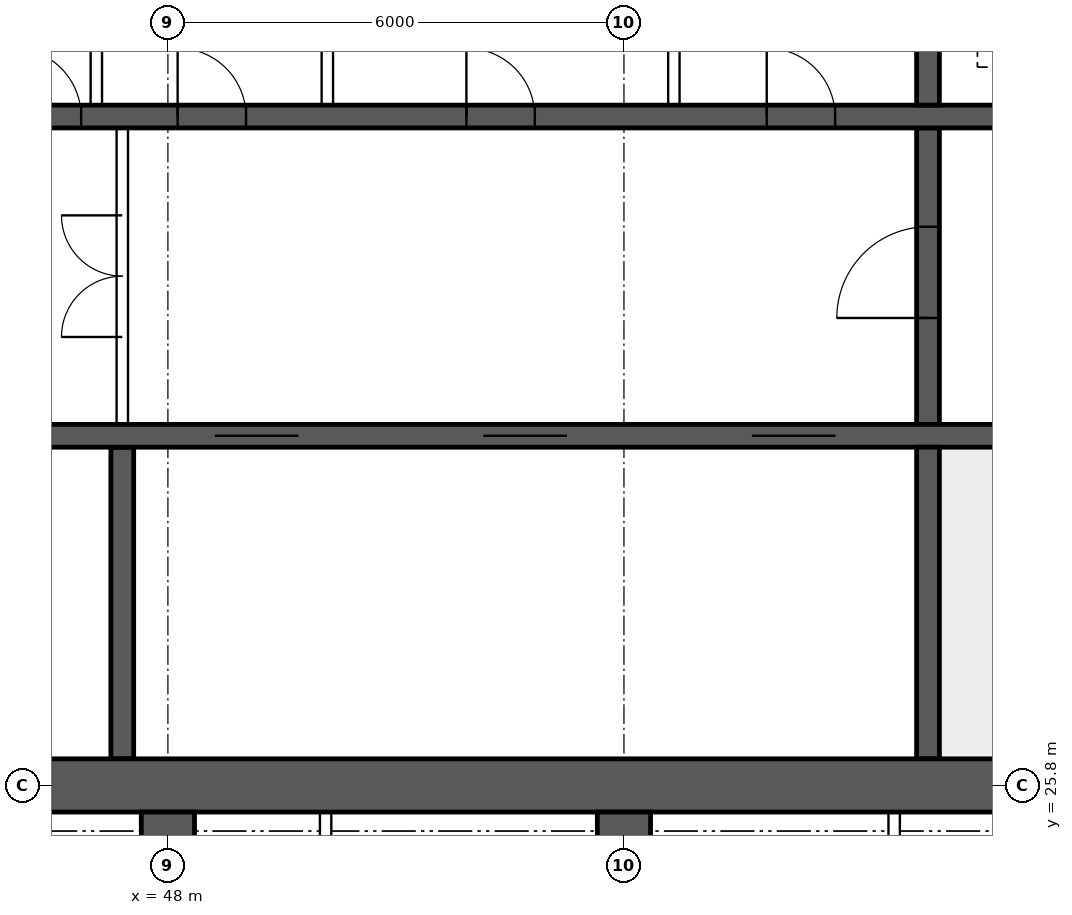
"""IFC4 building model, lengths in metres.
Left out: names, types, materials, properties, quantities, classifications, styles, units other than length and angle.
Written with IfcOpenShell. Run it as: python <this file> out.ifc"""

import sys

from ifc_helpers import new_model, si_unit, direction, frame, frame_2d, origin, place, context, subcontext, project, spatial, rectangle, extrude, element, fill, save


model = new_model("IFC4")
c1 = context("Model", 3, precision=1e-05, world=origin(), true_north=direction((0.0, 1.0)))
c2 = subcontext(c1, "Body", "Model", "MODEL_VIEW")
j1 = project(units=[si_unit("LENGTHUNIT", "METRE"), si_unit("PLANEANGLEUNIT", "RADIAN")], contexts=[c1])
p1 = place(None, origin())
s1 = spatial("IfcSite", under=j1, at=p1, CompositionType="ELEMENT")
p2 = place(p1, origin())
s2 = spatial("IfcBuilding", under=s1, at=p2, CompositionType="ELEMENT")
p3 = place(p2, frame((0.0, 0.0, 246.55)))
s3 = spatial("IfcBuildingStorey", under=s2, at=p3, CompositionType="ELEMENT", Elevation=246.55)
p4 = place(p3, frame((18.0, 25.8, 0.0), z_axis=(0.0, 0.0, 1.0), x_axis=(1.0, 0.0, 0.0)))
e1 = element("IfcWall", 1, at=p4, inside=s3, PredefinedType="SHEAR", context=c2, shape_type="SweptSolid", body=[
    extrude(rectangle(XDim=48.0, YDim=0.7, at=frame_2d((24.0, 0.0))), origin(), (0.0, 0.0, 1.0), 3.75),
])
p5 = place(p3, frame((18.35, 30.4, 0.0), z_axis=(0.0, 0.0, 1.0), x_axis=(1.0, 0.0, 0.0)))
e2 = element("IfcWall", 2, at=p5, inside=s3, PredefinedType="SHEAR", context=c2, shape_type="SweptSolid", body=[
    extrude(rectangle(XDim=47.3, YDim=0.3, at=frame_2d((23.65, 0.0))), origin(), (0.0, 0.0, 1.0), 3.75),
])
p6 = place(p5, frame((0.4, 0.0, 0.0)))
e3 = element("IfcOpeningElement", 3, at=p6, cuts=e2, PredefinedType="OPENING", context=c2, shape_type="SweptSolid", body=[
    extrude(rectangle(XDim=1.0, YDim=2.1, at=frame_2d((0.5, 1.05))), frame((0.0, 0.16, 0.0), z_axis=(0.0, -1.0, 0.0), x_axis=(1.0, 0.0, 0.0)), (0.0, 0.0, 1.0), 0.32),
])
p7 = place(p5, frame((45.9, 0.0, 0.0)))
e4 = element("IfcOpeningElement", 4, at=p7, cuts=e2, PredefinedType="OPENING", context=c2, shape_type="SweptSolid", body=[
    extrude(rectangle(XDim=1.0, YDim=2.1, at=frame_2d((0.5, 1.05))), frame((0.0, 0.16, 0.0), z_axis=(0.0, -1.0, 0.0), x_axis=(1.0, 0.0, 0.0)), (0.0, 0.0, 1.0), 0.32),
])
p8 = place(p5, frame((8.4, 0.0, 0.0)))
e5 = element("IfcOpeningElement", 5, at=p8, cuts=e2, PredefinedType="OPENING", context=c2, shape_type="SweptSolid", body=[
    extrude(rectangle(XDim=1.1, YDim=2.1, at=frame_2d((0.55, 1.05))), frame((0.0, 0.16, 0.0), z_axis=(0.0, -1.0, 0.0), x_axis=(1.0, 0.0, 0.0)), (0.0, 0.0, 1.0), 0.32),
])
p9 = place(p5, frame((11.0, 0.0, 0.0)))
e6 = element("IfcOpeningElement", 6, at=p9, cuts=e2, PredefinedType="OPENING", context=c2, shape_type="SweptSolid", body=[
    extrude(rectangle(XDim=1.1, YDim=2.1, at=frame_2d((0.55, 1.05))), frame((0.0, 0.16, 0.0), z_axis=(0.0, -1.0, 0.0), x_axis=(1.0, 0.0, 0.0)), (0.0, 0.0, 1.0), 0.32),
])
p10 = place(p5, frame((13.6, 0.0, 0.0)))
e7 = element("IfcOpeningElement", 7, at=p10, cuts=e2, PredefinedType="OPENING", context=c2, shape_type="SweptSolid", body=[
    extrude(rectangle(XDim=1.1, YDim=2.1, at=frame_2d((0.55, 1.05))), frame((0.0, 0.16, 0.0), z_axis=(0.0, -1.0, 0.0), x_axis=(1.0, 0.0, 0.0)), (0.0, 0.0, 1.0), 0.32),
])
p11 = place(p5, frame((16.2, 0.0, 0.0)))
e8 = element("IfcOpeningElement", 8, at=p11, cuts=e2, PredefinedType="OPENING", context=c2, shape_type="SweptSolid", body=[
    extrude(rectangle(XDim=1.1, YDim=2.1, at=frame_2d((0.55, 1.05))), frame((0.0, 0.16, 0.0), z_axis=(0.0, -1.0, 0.0), x_axis=(1.0, 0.0, 0.0)), (0.0, 0.0, 1.0), 0.32),
])
p12 = place(p5, frame((18.975, 0.0, 0.0)))
e9 = element("IfcOpeningElement", 9, at=p12, cuts=e2, PredefinedType="OPENING", context=c2, shape_type="SweptSolid", body=[
    extrude(rectangle(XDim=0.9, YDim=2.1, at=frame_2d((0.45, 1.05))), frame((0.0, 0.16, 0.0), z_axis=(0.0, -1.0, 0.0), x_axis=(1.0, 0.0, 0.0)), (0.0, 0.0, 1.0), 0.32),
])
p13 = place(p5, frame((24.475, 0.0, 0.0)))
e10 = element("IfcOpeningElement", 10, at=p13, cuts=e2, PredefinedType="OPENING", context=c2, shape_type="SweptSolid", body=[
    extrude(rectangle(XDim=0.9, YDim=2.1, at=frame_2d((0.45, 1.05))), frame((0.0, 0.16, 0.0), z_axis=(0.0, -1.0, 0.0), x_axis=(1.0, 0.0, 0.0)), (0.0, 0.0, 1.0), 0.32),
])
p14 = place(p5, frame((30.267, 0.0, 0.0)))
e11 = element("IfcOpeningElement", 11, at=p14, cuts=e2, PredefinedType="OPENING", context=c2, shape_type="SweptSolid", body=[
    extrude(rectangle(XDim=1.1, YDim=2.1, at=frame_2d((0.55, 1.05))), frame((0.0, 0.16, 0.0), z_axis=(0.0, -1.0, 0.0), x_axis=(1.0, 0.0, 0.0)), (0.0, 0.0, 1.0), 0.32),
])
p15 = place(p5, frame((33.8, 0.0, 0.0)))
e12 = element("IfcOpeningElement", 12, at=p15, cuts=e2, PredefinedType="OPENING", context=c2, shape_type="SweptSolid", body=[
    extrude(rectangle(XDim=1.1, YDim=2.1, at=frame_2d((0.55, 1.05))), frame((0.0, 0.16, 0.0), z_axis=(0.0, -1.0, 0.0), x_axis=(1.0, 0.0, 0.0)), (0.0, 0.0, 1.0), 0.32),
])
p16 = place(p5, frame((37.333, 0.0, 0.0)))
e13 = element("IfcOpeningElement", 13, at=p16, cuts=e2, PredefinedType="OPENING", context=c2, shape_type="SweptSolid", body=[
    extrude(rectangle(XDim=1.1, YDim=2.1, at=frame_2d((0.55, 1.05))), frame((0.0, 0.16, 0.0), z_axis=(0.0, -1.0, 0.0), x_axis=(1.0, 0.0, 0.0)), (0.0, 0.0, 1.0), 0.32),
])
p17 = place(p3, frame((18.35, 34.6, 0.0), z_axis=(0.0, 0.0, 1.0), x_axis=(1.0, 0.0, 0.0)))
e14 = element("IfcWall", 14, at=p17, inside=s3, PredefinedType="SHEAR", context=c2, shape_type="SweptSolid", body=[
    extrude(rectangle(XDim=47.3, YDim=0.3, at=frame_2d((23.65, 0.0))), origin(), (0.0, 0.0, 1.0), 3.75),
])
p18 = place(p17, frame((0.9, 0.0, 0.0)))
e15 = element("IfcOpeningElement", 15, at=p18, cuts=e14, PredefinedType="OPENING", context=c2, shape_type="SweptSolid", body=[
    extrude(rectangle(XDim=1.1, YDim=2.1, at=frame_2d((0.55, 1.05))), frame((0.0, 0.16, 0.0), z_axis=(0.0, -1.0, 0.0), x_axis=(1.0, 0.0, 0.0)), (0.0, 0.0, 1.0), 0.32),
])
p19 = place(p17, frame((45.3, 0.0, 0.0)))
e16 = element("IfcOpeningElement", 16, at=p19, cuts=e14, PredefinedType="OPENING", context=c2, shape_type="SweptSolid", body=[
    extrude(rectangle(XDim=1.1, YDim=2.1, at=frame_2d((0.55, 1.05))), frame((0.0, 0.16, 0.0), z_axis=(0.0, -1.0, 0.0), x_axis=(1.0, 0.0, 0.0)), (0.0, 0.0, 1.0), 0.32),
])
p20 = place(p17, frame((4.25, 0.0, 0.0)))
e17 = element("IfcOpeningElement", 17, at=p20, cuts=e14, PredefinedType="OPENING", context=c2, shape_type="SweptSolid", body=[
    extrude(rectangle(XDim=0.9, YDim=2.1, at=frame_2d((0.45, 1.05))), frame((0.0, 0.16, 0.0), z_axis=(0.0, -1.0, 0.0), x_axis=(1.0, 0.0, 0.0)), (0.0, 0.0, 1.0), 0.32),
])
p21 = place(p17, frame((42.15, 0.0, 0.0)))
e18 = element("IfcOpeningElement", 18, at=p21, cuts=e14, PredefinedType="OPENING", context=c2, shape_type="SweptSolid", body=[
    extrude(rectangle(XDim=0.9, YDim=2.1, at=frame_2d((0.45, 1.05))), frame((0.0, 0.16, 0.0), z_axis=(0.0, -1.0, 0.0), x_axis=(1.0, 0.0, 0.0)), (0.0, 0.0, 1.0), 0.32),
])
p22 = place(p17, frame((9.025, 0.0, 0.0)))
e19 = element("IfcOpeningElement", 19, at=p22, cuts=e14, PredefinedType="OPENING", context=c2, shape_type="SweptSolid", body=[
    extrude(rectangle(XDim=0.9, YDim=2.1, at=frame_2d((0.45, 1.05))), frame((0.0, 0.16, 0.0), z_axis=(0.0, -1.0, 0.0), x_axis=(1.0, 0.0, 0.0)), (0.0, 0.0, 1.0), 0.32),
])
p23 = place(p17, frame((12.999, 0.0, 0.0)))
e20 = element("IfcOpeningElement", 20, at=p23, cuts=e14, PredefinedType="OPENING", context=c2, shape_type="SweptSolid", body=[
    extrude(rectangle(XDim=0.9, YDim=2.1, at=frame_2d((0.45, 1.05))), frame((0.0, 0.16, 0.0), z_axis=(0.0, -1.0, 0.0), x_axis=(1.0, 0.0, 0.0)), (0.0, 0.0, 1.0), 0.32),
])
p24 = place(p17, frame((16.646, 0.0, 0.0)))
e21 = element("IfcOpeningElement", 21, at=p24, cuts=e14, PredefinedType="OPENING", context=c2, shape_type="SweptSolid", body=[
    extrude(rectangle(XDim=0.9, YDim=2.1, at=frame_2d((0.45, 1.05))), frame((0.0, 0.16, 0.0), z_axis=(0.0, -1.0, 0.0), x_axis=(1.0, 0.0, 0.0)), (0.0, 0.0, 1.0), 0.32),
])
p25 = place(p17, frame((20.405, 0.0, 0.0)))
e22 = element("IfcOpeningElement", 22, at=p25, cuts=e14, PredefinedType="OPENING", context=c2, shape_type="SweptSolid", body=[
    extrude(rectangle(XDim=0.9, YDim=2.1, at=frame_2d((0.45, 1.05))), frame((0.0, 0.16, 0.0), z_axis=(0.0, -1.0, 0.0), x_axis=(1.0, 0.0, 0.0)), (0.0, 0.0, 1.0), 0.32),
])
p26 = place(p17, frame((24.811, 0.0, 0.0)))
e23 = element("IfcOpeningElement", 23, at=p26, cuts=e14, PredefinedType="OPENING", context=c2, shape_type="SweptSolid", body=[
    extrude(rectangle(XDim=0.9, YDim=2.1, at=frame_2d((0.45, 1.05))), frame((0.0, 0.16, 0.0), z_axis=(0.0, -1.0, 0.0), x_axis=(1.0, 0.0, 0.0)), (0.0, 0.0, 1.0), 0.32),
])
p27 = place(p17, frame((27.608, 0.0, 0.0)))
e24 = element("IfcOpeningElement", 24, at=p27, cuts=e14, PredefinedType="OPENING", context=c2, shape_type="SweptSolid", body=[
    extrude(rectangle(XDim=0.9, YDim=2.1, at=frame_2d((0.45, 1.05))), frame((0.0, 0.16, 0.0), z_axis=(0.0, -1.0, 0.0), x_axis=(1.0, 0.0, 0.0)), (0.0, 0.0, 1.0), 0.32),
])
p28 = place(p17, frame((29.778, 0.0, 0.0)))
e25 = element("IfcOpeningElement", 25, at=p28, cuts=e14, PredefinedType="OPENING", context=c2, shape_type="SweptSolid", body=[
    extrude(rectangle(XDim=0.9, YDim=2.1, at=frame_2d((0.45, 1.05))), frame((0.0, 0.16, 0.0), z_axis=(0.0, -1.0, 0.0), x_axis=(1.0, 0.0, 0.0)), (0.0, 0.0, 1.0), 0.32),
])
p29 = place(p17, frame((33.577, 0.0, 0.0)))
e26 = element("IfcOpeningElement", 26, at=p29, cuts=e14, PredefinedType="OPENING", context=c2, shape_type="SweptSolid", body=[
    extrude(rectangle(XDim=0.9, YDim=2.1, at=frame_2d((0.45, 1.05))), frame((0.0, 0.16, 0.0), z_axis=(0.0, -1.0, 0.0), x_axis=(1.0, 0.0, 0.0)), (0.0, 0.0, 1.0), 0.32),
])
p30 = place(p17, frame((37.528, 0.0, 0.0)))
e27 = element("IfcOpeningElement", 27, at=p30, cuts=e14, PredefinedType="OPENING", context=c2, shape_type="SweptSolid", body=[
    extrude(rectangle(XDim=0.9, YDim=2.1, at=frame_2d((0.45, 1.05))), frame((0.0, 0.16, 0.0), z_axis=(0.0, -1.0, 0.0), x_axis=(1.0, 0.0, 0.0)), (0.0, 0.0, 1.0), 0.32),
])
p31 = place(p3, frame((58.0, 26.15, 0.0), z_axis=(0.0, 0.0, 1.0), x_axis=(0.0, 1.0, 0.0)))
e28 = element("IfcWall", 28, at=p31, inside=s3, PredefinedType="SHEAR", context=c2, shape_type="SweptSolid", body=[
    extrude(rectangle(XDim=4.1, YDim=0.3, at=frame_2d((2.05, 0.0))), origin(), (0.0, 0.0, 1.0), 3.75),
])
p32 = place(p3, frame((58.0, 30.55, 0.0), z_axis=(0.0, 0.0, 1.0), x_axis=(0.0, 1.0, 0.0)))
e29 = element("IfcWall", 29, at=p32, inside=s3, PredefinedType="SHEAR", context=c2, shape_type="SweptSolid", body=[
    extrude(rectangle(XDim=3.9, YDim=0.3, at=frame_2d((1.95, 0.0))), origin(), (0.0, 0.0, 1.0), 3.75),
])
p33 = place(p32, frame((1.4, 0.0, 0.0)))
e30 = element("IfcOpeningElement", 30, at=p33, cuts=e29, PredefinedType="OPENING", context=c2, shape_type="SweptSolid", body=[
    extrude(rectangle(XDim=1.2, YDim=2.1, at=frame_2d((0.6, 1.05))), frame((0.0, 0.16, 0.0), z_axis=(0.0, -1.0, 0.0), x_axis=(1.0, 0.0, 0.0)), (0.0, 0.0, 1.0), 0.32),
])
p34 = place(p3, frame((58.0, 34.75, 0.0), z_axis=(0.0, 0.0, 1.0), x_axis=(0.0, 1.0, 0.0)))
e31 = element("IfcWall", 31, at=p34, inside=s3, PredefinedType="SHEAR", context=c2, shape_type="SweptSolid", body=[
    extrude(rectangle(XDim=3.1, YDim=0.3, at=frame_2d((1.55, 0.0))), origin(), (0.0, 0.0, 1.0), 3.75),
])
p35 = place(p3, frame((47.4, 26.15, 0.0), z_axis=(0.0, 0.0, 1.0), x_axis=(0.0, 1.0, 0.0)))
e32 = element("IfcWall", 32, at=p35, inside=s3, PredefinedType="SHEAR", context=c2, shape_type="SweptSolid", body=[
    extrude(rectangle(XDim=4.1, YDim=0.3, at=frame_2d((2.05, 0.0))), origin(), (0.0, 0.0, 1.0), 3.75),
])
for number, where, z_axis, x_axis in (
    (33, (48.0, 18.4, 0.0), (0.0, 0.0, 1.0), (0.0, 1.0, 0.0)),
    (34, (54.0, 18.4, 0.0), (0.0, 0.0, 1.0), (0.0, 1.0, 0.0)),
):
    element("IfcWall", number, at=place(p3, frame(where, z_axis=z_axis, x_axis=x_axis)), inside=s3, PredefinedType="SHEAR", context=c2, shape_type="SweptSolid", body=[
        extrude(rectangle(XDim=7.05, YDim=0.7, at=frame_2d((3.525, 0.0))), origin(), (0.0, 0.0, 1.0), 3.75),
    ])
p36 = place(p3, frame((47.4, 30.55, 0.0), z_axis=(0.0, 0.0, 1.0), x_axis=(0.0, 1.0, 0.0)))
e35 = element("IfcWall", 35, at=p36, inside=s3, PredefinedType="SOLIDWALL", context=c2, shape_type="SweptSolid", body=[
    extrude(rectangle(XDim=3.9, YDim=0.15, at=frame_2d((1.95, 0.0))), origin(), (0.0, 0.0, 1.0), 3.5),
])
p37 = place(p36, frame((1.15, 0.0, 0.0)))
e36 = element("IfcOpeningElement", 36, at=p37, cuts=e35, PredefinedType="OPENING", context=c2, shape_type="SweptSolid", body=[
    extrude(rectangle(XDim=1.6, YDim=2.1, at=frame_2d((0.8, 1.05))), frame((0.0, 0.085, 0.0), z_axis=(0.0, -1.0, 0.0), x_axis=(1.0, 0.0, 0.0)), (0.0, 0.0, 1.0), 0.17),
])
for number, where, z_axis, x_axis in (
    (37, (47.058, 34.75, 0.0), (0.0, 0.0, 1.0), (0.0, 1.0, 0.0)),
    (38, (50.098, 34.75, 0.0), (0.0, 0.0, 1.0), (0.0, 1.0, 0.0)),
    (39, (54.657, 34.75, 0.0), (0.0, 0.0, 1.0), (0.0, 1.0, 0.0)),
):
    element("IfcWall", number, at=place(p3, frame(where, z_axis=z_axis, x_axis=x_axis)), inside=s3, PredefinedType="SOLIDWALL", context=c2, shape_type="SweptSolid", body=[
        extrude(rectangle(XDim=3.1, YDim=0.15, at=frame_2d((1.55, 0.0))), origin(), (0.0, 0.0, 1.0), 3.5),
    ])
for number, where, z_axis, x_axis in (
    (40, (50.075, 18.5, 0.0), (0.0, 0.0, 1.0), (0.0, 1.0, 0.0)),
    (41, (57.555, 18.5, 0.0), (0.0, 0.0, 1.0), (0.0, 1.0, 0.0)),
):
    element("IfcWall", number, at=place(p3, frame(where, z_axis=z_axis, x_axis=x_axis)), inside=s3, PredefinedType="PARTITIONING", context=c2, shape_type="SweptSolid", body=[
        extrude(rectangle(XDim=6.95, YDim=0.15, at=frame_2d((3.475, 0.0))), origin(), (0.0, 0.0, 1.0), 3.5),
    ])
p38 = place(p37, origin())
e42 = element("IfcDoor", 42, at=p38, inside=s3, OperationType="DOUBLE_DOOR_SINGLE_SWING", PredefinedType="DOOR", context=c2, shape_type="SweptSolid", body=[
    extrude(rectangle(XDim=1.6, YDim=2.1, at=frame_2d((0.8, 1.05))), frame((0.0, 0.025, 0.0), z_axis=(0.0, -1.0, 0.0), x_axis=(1.0, 0.0, 0.0)), (0.0, 0.0, 1.0), 0.05),
])
fill(e36, e42)
p39 = place(p33, origin())
e43 = element("IfcDoor", 43, at=p39, inside=s3, OperationType="SINGLE_SWING_LEFT", PredefinedType="DOOR", context=c2, shape_type="SweptSolid", body=[
    extrude(rectangle(XDim=1.2, YDim=2.1, at=frame_2d((0.6, 1.05))), frame((0.0, 0.025, 0.0), z_axis=(0.0, -1.0, 0.0), x_axis=(1.0, 0.0, 0.0)), (0.0, 0.0, 1.0), 0.05),
])
fill(e30, e43)
p40 = place(p27, origin())
e44 = element("IfcDoor", 44, at=p40, inside=s3, OperationType="SINGLE_SWING_LEFT", PredefinedType="DOOR", context=c2, shape_type="SweptSolid", body=[
    extrude(rectangle(XDim=0.9, YDim=2.1, at=frame_2d((0.45, 1.05))), frame((0.0, 0.025, 0.0), z_axis=(0.0, -1.0, 0.0), x_axis=(1.0, 0.0, 0.0)), (0.0, 0.0, 1.0), 0.05),
])
fill(e24, e44)
p41 = place(p28, origin())
e45 = element("IfcDoor", 45, at=p41, inside=s3, OperationType="SINGLE_SWING_LEFT", PredefinedType="DOOR", context=c2, shape_type="SweptSolid", body=[
    extrude(rectangle(XDim=0.9, YDim=2.1, at=frame_2d((0.45, 1.05))), frame((0.0, 0.025, 0.0), z_axis=(0.0, -1.0, 0.0), x_axis=(1.0, 0.0, 0.0)), (0.0, 0.0, 1.0), 0.05),
])
fill(e25, e45)
p42 = place(p29, origin())
e46 = element("IfcDoor", 46, at=p42, inside=s3, OperationType="SINGLE_SWING_LEFT", PredefinedType="DOOR", context=c2, shape_type="SweptSolid", body=[
    extrude(rectangle(XDim=0.9, YDim=2.1, at=frame_2d((0.45, 1.05))), frame((0.0, 0.025, 0.0), z_axis=(0.0, -1.0, 0.0), x_axis=(1.0, 0.0, 0.0)), (0.0, 0.0, 1.0), 0.05),
])
fill(e26, e46)
p43 = place(p30, origin())
e47 = element("IfcDoor", 47, at=p43, inside=s3, OperationType="SINGLE_SWING_LEFT", PredefinedType="DOOR", context=c2, shape_type="SweptSolid", body=[
    extrude(rectangle(XDim=0.9, YDim=2.1, at=frame_2d((0.45, 1.05))), frame((0.0, 0.025, 0.0), z_axis=(0.0, -1.0, 0.0), x_axis=(1.0, 0.0, 0.0)), (0.0, 0.0, 1.0), 0.05),
])
fill(e27, e47)
p44 = place(p14, origin())
e48 = element("IfcDoor", 48, at=p44, inside=s3, OperationType="DOUBLE_DOOR_SLIDING", PredefinedType="DOOR", context=c2, shape_type="SweptSolid", body=[
    extrude(rectangle(XDim=1.1, YDim=2.1, at=frame_2d((0.55, 1.05))), frame((0.0, 0.025, 0.0), z_axis=(0.0, -1.0, 0.0), x_axis=(1.0, 0.0, 0.0)), (0.0, 0.0, 1.0), 0.05),
])
fill(e11, e48)
p45 = place(p15, origin())
e49 = element("IfcDoor", 49, at=p45, inside=s3, OperationType="DOUBLE_DOOR_SLIDING", PredefinedType="DOOR", context=c2, shape_type="SweptSolid", body=[
    extrude(rectangle(XDim=1.1, YDim=2.1, at=frame_2d((0.55, 1.05))), frame((0.0, 0.025, 0.0), z_axis=(0.0, -1.0, 0.0), x_axis=(1.0, 0.0, 0.0)), (0.0, 0.0, 1.0), 0.05),
])
fill(e12, e49)
p46 = place(p16, origin())
e50 = element("IfcDoor", 50, at=p46, inside=s3, OperationType="DOUBLE_DOOR_SLIDING", PredefinedType="DOOR", context=c2, shape_type="SweptSolid", body=[
    extrude(rectangle(XDim=1.1, YDim=2.1, at=frame_2d((0.55, 1.05))), frame((0.0, 0.025, 0.0), z_axis=(0.0, -1.0, 0.0), x_axis=(1.0, 0.0, 0.0)), (0.0, 0.0, 1.0), 0.05),
])
fill(e13, e50)
save(model, sys.argv[1])
